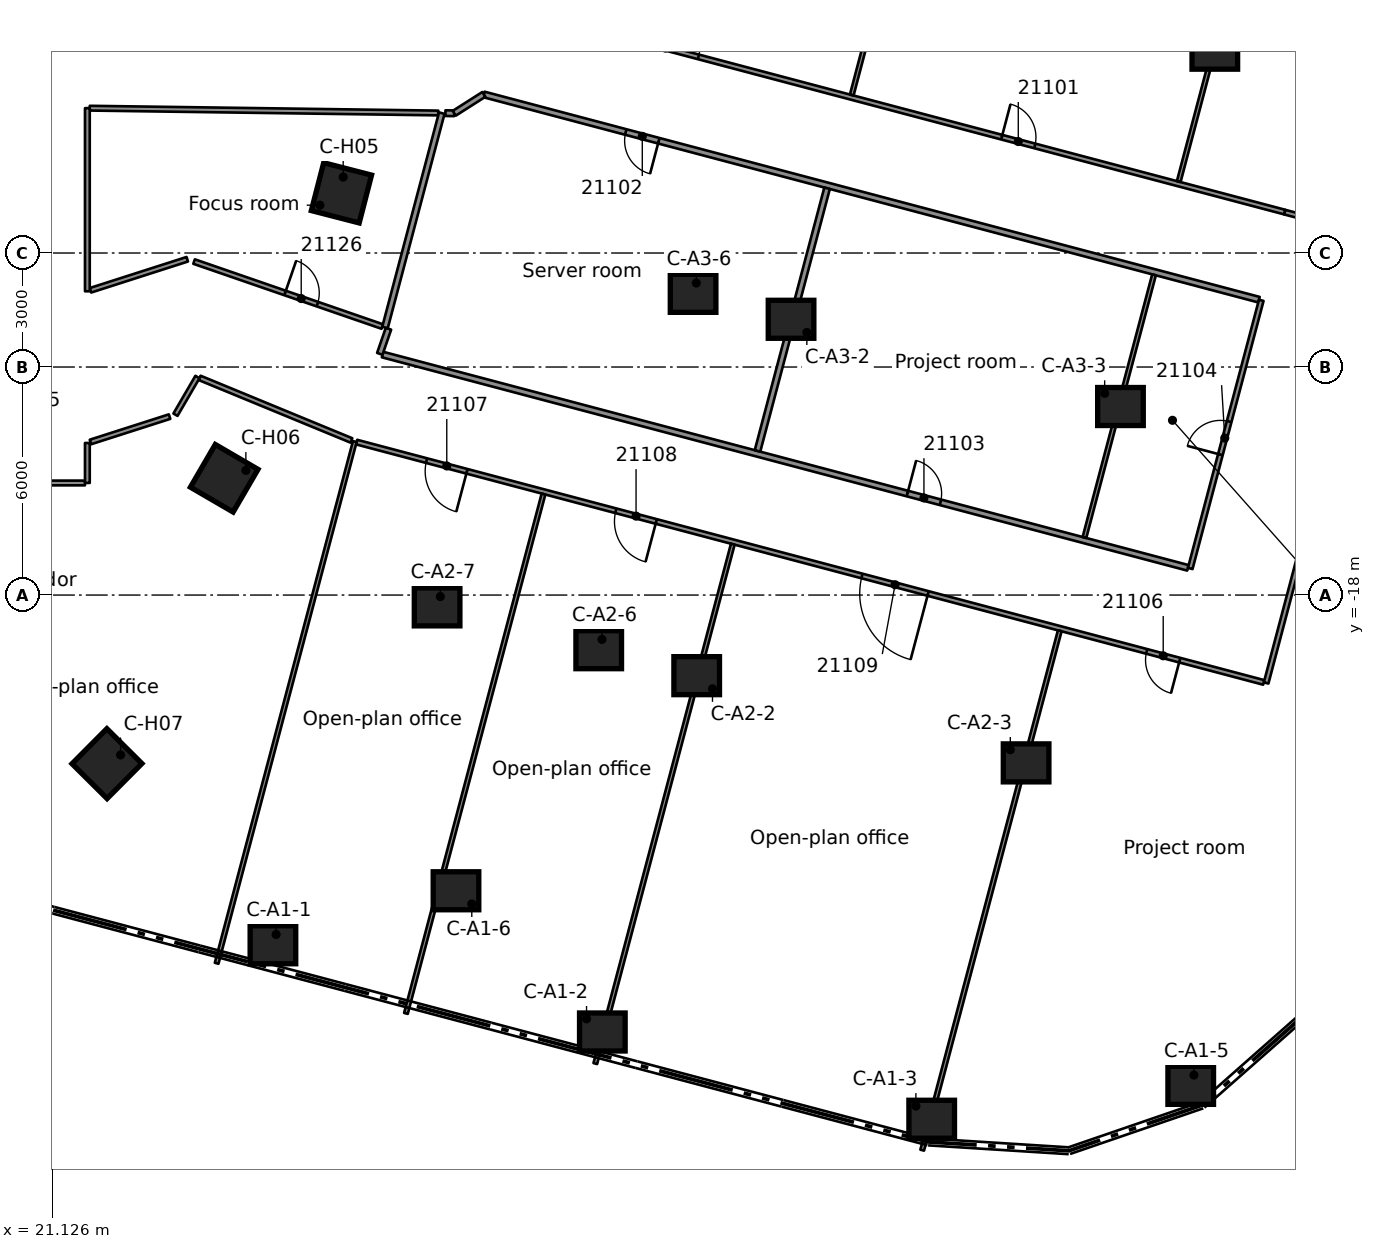
"""IFC4 building model, lengths in metres.
Left out: names, types, materials, properties, quantities, classifications, styles, units other than length and angle.
Written with IfcOpenShell. Run it as: python <this file> out.ifc"""

import sys

from ifc_helpers import new_model, si_unit, direction, frame, frame_2d, origin, origin_2d, place, context, subcontext, project, spatial, rectangle, extrude, element, fill, save


model = new_model("IFC4")
c1 = context("Model", 3, precision=1e-05, world=origin(), true_north=direction((0.0, 1.0)))
c2 = subcontext(c1, "Body", "Model", "MODEL_VIEW")
j1 = project(units=[si_unit("LENGTHUNIT", "METRE"), si_unit("PLANEANGLEUNIT", "RADIAN")], contexts=[c1])
p1 = place(None, origin())
s1 = spatial("IfcSite", under=j1, at=p1, CompositionType="ELEMENT")
p2 = place(p1, origin())
s2 = spatial("IfcBuilding", under=s1, at=p2, CompositionType="ELEMENT")
p3 = place(p2, frame((0.0, 0.0, 105.7)))
s3 = spatial("IfcBuildingStorey", under=s2, at=p3, CompositionType="ELEMENT", Elevation=105.7)
for number, where, z_axis, x_axis in (
    (1, (26.934, -27.202, 0.0), (0.0, 0.0, 1.0), (1.0, 0.0, 0.0)),
    (2, (35.602, -29.497, 0.0), (0.0, 0.0, 1.0), (1.0, 0.0, 0.0)),
    (3, (44.269, -31.793, 0.0), (0.0, 0.0, 1.0), (1.0, 0.0, 0.0)),
    (4, (51.085, -30.901, 0.0), (0.0, 0.0, 1.0), (1.0, 0.0, 0.0)),
    (5, (31.751, -25.781, 0.0), (0.0, 0.0, 1.0), (1.0, 0.0, 0.0)),
    (6, (38.085, -20.121, 0.0), (0.0, 0.0, 1.0), (1.0, 0.0, 0.0)),
    (7, (46.753, -22.416, 0.0), (0.0, 0.0, 1.0), (1.0, 0.0, 0.0)),
    (8, (35.507, -19.438, 0.0), (0.0, 0.0, 1.0), (1.0, 0.0, 0.0)),
    (9, (31.254, -18.311, 0.0), (0.0, 0.0, 1.0), (1.0, 0.0, 0.0)),
    (10, (40.568, -10.744, 0.0), (0.0, 0.0, 1.0), (1.0, 0.0, 0.0)),
    (11, (49.236, -13.039, 0.0), (0.0, 0.0, 1.0), (1.0, 0.0, 0.0)),
    (12, (37.99, -10.061, 0.0), (0.0, 0.0, 1.0), (1.0, 0.0, 0.0)),
    (13, (51.719, -3.663, 0.0), (0.0, 0.0, 1.0), (1.0, 0.0, 0.0)),
):
    element("IfcColumn", number, at=place(p3, frame(where, z_axis=z_axis, x_axis=x_axis)), inside=s3, PredefinedType="COLUMN", context=c2, shape_type="SweptSolid", body=[
        extrude(rectangle(XDim=1.2, YDim=1.0, at=origin_2d()), origin(), (0.0, 0.0, 1.0), 3.5),
    ])
for number, where, z_axis, x_axis in (
    (14, (28.737, -7.417, 0.0), (0.0, 0.0, 1.0), (0.968, -0.25, 0.0)),
    (15, (25.652, -14.927, 0.0), (0.0, 0.0, 1.0), (0.864, -0.503, 0.0)),
    (16, (22.567, -22.436, 0.0), (0.0, 0.0, 1.0), (0.709, -0.705, 0.0)),
):
    element("IfcColumn", number, at=place(p3, frame(where, z_axis=z_axis, x_axis=x_axis)), inside=s3, PredefinedType="COLUMN", context=c2, shape_type="SweptSolid", body=[
        extrude(rectangle(XDim=1.3, YDim=1.3, at=origin_2d()), origin(), (0.0, 0.0, 1.0), 3.5),
    ])
p4 = place(p3, frame((25.006, -12.286, 0.0), z_axis=(0.0, 0.0, 1.0), x_axis=(0.924527003777, -0.38111654292, 0.0)))
e17 = element("IfcWall", 17, at=p4, inside=s3, PredefinedType="PARTITIONING", context=c2, shape_type="SweptSolid", body=[
    extrude(rectangle(XDim=4.319, YDim=0.125, at=frame_2d((2.159, 0.0))), origin(), (0.0, 0.0, 1.0), 3.08),
])
p5 = place(p3, frame((24.859, -9.225, 0.0), z_axis=(0.0, 0.0, 1.0), x_axis=(0.945256069843, -0.326329530421, 0.0)))
e18 = element("IfcWall", 18, at=p5, inside=s3, PredefinedType="PARTITIONING", context=c2, shape_type="SweptSolid", body=[
    extrude(rectangle(XDim=5.24, YDim=0.125, at=frame_2d((2.62, 0.0))), origin(), (0.0, 0.0, 1.0), 3.08),
])
p6 = place(p5, frame((2.533, 0.0, 0.0)))
e19 = element("IfcOpeningElement", 19, at=p6, cuts=e18, PredefinedType="OPENING", context=c2, shape_type="SweptSolid", body=[
    extrude(rectangle(XDim=0.9, YDim=2.1, at=frame_2d((0.45, 1.05))), frame((0.0, 0.073, 0.0), z_axis=(0.0, -1.0, 0.0), x_axis=(1.0, 0.0, 0.0)), (0.0, 0.0, 1.0), 0.145),
])
p7 = place(p3, frame((56.106, -8.6, 0.0), z_axis=(0.0, 0.0, 1.0), x_axis=(-0.966610224472, 0.256251193065, 0.0)))
e20 = element("IfcWall", 20, at=p7, inside=s3, PredefinedType="PARTITIONING", context=c2, shape_type="SweptSolid", body=[
    extrude(rectangle(XDim=2.638, YDim=0.125, at=frame_2d((1.319, 0.0))), origin(), (0.0, 0.0, 1.0), 3.08),
])
p8 = place(p3, frame((53.007, -20.299, 0.0), z_axis=(0.0, 0.0, 1.0), x_axis=(-0.966653562273, 0.256087661835, 0.0)))
e21 = element("IfcWall", 21, at=p8, inside=s3, PredefinedType="PARTITIONING", context=c2, shape_type="SweptSolid", body=[
    extrude(rectangle(XDim=24.695, YDim=0.125, at=frame_2d((12.347, 0.0))), origin(), (0.0, 0.0, 1.0), 3.08),
])
p9 = place(p8, frame((2.287, 0.0, 0.0)))
e22 = element("IfcOpeningElement", 22, at=p9, cuts=e21, PredefinedType="OPENING", context=c2, shape_type="SweptSolid", body=[
    extrude(rectangle(XDim=0.9, YDim=2.1, at=frame_2d((0.45, 1.05))), frame((0.0, 0.073, 0.0), z_axis=(0.0, -1.0, 0.0), x_axis=(1.0, 0.0, 0.0)), (0.0, 0.0, 1.0), 0.145),
])
p10 = place(p8, frame((21.69, 0.0, 0.0)))
e23 = element("IfcOpeningElement", 23, at=p10, cuts=e21, PredefinedType="OPENING", context=c2, shape_type="SweptSolid", body=[
    extrude(rectangle(XDim=1.1, YDim=2.1, at=frame_2d((0.55, 1.05))), frame((0.0, 0.073, 0.0), z_axis=(0.0, -1.0, 0.0), x_axis=(1.0, 0.0, 0.0)), (0.0, 0.0, 1.0), 0.145),
])
p11 = place(p8, frame((16.538, 0.0, 0.0)))
e24 = element("IfcOpeningElement", 24, at=p11, cuts=e21, PredefinedType="OPENING", context=c2, shape_type="SweptSolid", body=[
    extrude(rectangle(XDim=1.1, YDim=2.1, at=frame_2d((0.55, 1.05))), frame((0.0, 0.073, 0.0), z_axis=(0.0, -1.0, 0.0), x_axis=(1.0, 0.0, 0.0)), (0.0, 0.0, 1.0), 0.145),
])
p12 = place(p8, frame((9.137, 0.0, 0.0)))
e25 = element("IfcOpeningElement", 25, at=p12, cuts=e21, PredefinedType="OPENING", context=c2, shape_type="SweptSolid", body=[
    extrude(rectangle(XDim=1.8, YDim=2.1, at=frame_2d((0.9, 1.05))), frame((0.0, 0.073, 0.0), z_axis=(0.0, -1.0, 0.0), x_axis=(1.0, 0.0, 0.0)), (0.0, 0.0, 1.0), 0.145),
])
p13 = place(p3, frame((29.819, -11.672, 0.0), z_axis=(0.0, 0.0, 1.0), x_axis=(0.966680429276, -0.255986225517, 0.0)))
e26 = element("IfcWall", 26, at=p13, inside=s3, PredefinedType="PARTITIONING", context=c2, shape_type="SweptSolid", body=[
    extrude(rectangle(XDim=21.922, YDim=0.15, at=frame_2d((10.961, 0.0))), origin(), (0.0, 0.0, 1.0), 3.08),
])
p14 = place(p13, frame((14.287, 0.0, 0.0)))
e27 = element("IfcOpeningElement", 27, at=p14, cuts=e26, PredefinedType="OPENING", context=c2, shape_type="SweptSolid", body=[
    extrude(rectangle(XDim=0.9, YDim=2.1, at=frame_2d((0.45, 1.05))), frame((0.0, 0.085, 0.0), z_axis=(0.0, -1.0, 0.0), x_axis=(1.0, 0.0, 0.0)), (0.0, 0.0, 1.0), 0.17),
])
p15 = place(p3, frame((52.881, -10.228, 0.0), z_axis=(0.0, 0.0, 1.0), x_axis=(-0.966683420864, 0.255974928122, 0.0)))
e28 = element("IfcWall", 28, at=p15, inside=s3, PredefinedType="PARTITIONING", context=c2, shape_type="SweptSolid", body=[
    extrude(rectangle(XDim=21.1, YDim=0.15, at=frame_2d((10.55, 0.0))), origin(), (0.0, 0.0, 1.0), 3.08),
])
p16 = place(p15, frame((16.337, 0.0, 0.0)))
e29 = element("IfcOpeningElement", 29, at=p16, cuts=e28, PredefinedType="OPENING", context=c2, shape_type="SweptSolid", body=[
    extrude(rectangle(XDim=0.9, YDim=2.1, at=frame_2d((0.45, 1.05))), frame((0.0, 0.085, 0.0), z_axis=(0.0, -1.0, 0.0), x_axis=(1.0, 0.0, 0.0)), (0.0, 0.0, 1.0), 0.17),
])
p17 = place(p3, frame((32.263, -2.286, 0.0), z_axis=(0.0, 0.0, 1.0), x_axis=(0.966698776393, -0.255916931288, 0.0)))
e30 = element("IfcWall", 30, at=p17, inside=s3, PredefinedType="PARTITIONING", context=c2, shape_type="SweptSolid", body=[
    extrude(rectangle(XDim=22.028, YDim=0.125, at=frame_2d((11.014, 0.0))), origin(), (0.0, 0.0, 1.0), 3.08),
])
p18 = place(p17, frame((4.27, 0.0, 0.0)))
e31 = element("IfcOpeningElement", 31, at=p18, cuts=e30, PredefinedType="OPENING", context=c2, shape_type="SweptSolid", body=[
    extrude(rectangle(XDim=1.8, YDim=2.1, at=frame_2d((0.9, 1.05))), frame((0.0, 0.073, 0.0), z_axis=(0.0, -1.0, 0.0), x_axis=(1.0, 0.0, 0.0)), (0.0, 0.0, 1.0), 0.145),
])
p19 = place(p17, frame((14.326, 0.0, 0.0)))
e32 = element("IfcOpeningElement", 32, at=p19, cuts=e30, PredefinedType="OPENING", context=c2, shape_type="SweptSolid", body=[
    extrude(rectangle(XDim=0.9, YDim=2.1, at=frame_2d((0.45, 1.05))), frame((0.0, 0.073, 0.0), z_axis=(0.0, -1.0, 0.0), x_axis=(1.0, 0.0, 0.0)), (0.0, 0.0, 1.0), 0.145),
])
p20 = place(p3, frame((31.473, -5.32, 0.0), z_axis=(0.0, 0.0, 1.0), x_axis=(0.999857302277, -0.016893048402, 0.0)))
e33 = element("IfcWall", 33, at=p20, inside=s3, PredefinedType="PARTITIONING", context=c2, shape_type="SweptSolid", body=[
    extrude(rectangle(XDim=0.231, YDim=0.15, at=frame_2d((0.116, 0.0))), origin(), (0.0, 0.0, 1.0), 3.08),
])
p21 = place(p3, frame((22.113, -5.189, 0.0), z_axis=(0.0, 0.0, 1.0), x_axis=(0.99990421927, -0.013840241536, 0.0)))
e34 = element("IfcWall", 34, at=p21, inside=s3, PredefinedType="PARTITIONING", context=c2, shape_type="SweptSolid", body=[
    extrude(rectangle(XDim=9.173, YDim=0.125, at=frame_2d((4.586, 0.0))), origin(), (0.0, 0.0, 1.0), 3.08),
])
p22 = place(p3, frame((21.988, -15.051, 0.0), z_axis=(0.0, 0.0, 1.0), x_axis=(-1.0, 0.0, 0.0)))
e35 = element("IfcWall", 35, at=p22, inside=s3, PredefinedType="PARTITIONING", context=c2, shape_type="SweptSolid", body=[
    extrude(rectangle(XDim=10.997, YDim=0.125, at=frame_2d((5.499, 0.0))), origin(), (0.0, 0.0, 1.0), 3.08),
])
p23 = place(p22, frame((7.816, 0.0, 0.0)))
e36 = element("IfcOpeningElement", 36, at=p23, cuts=e35, PredefinedType="OPENING", context=c2, shape_type="SweptSolid", body=[
    extrude(rectangle(XDim=0.9, YDim=2.1, at=frame_2d((0.45, 1.05))), frame((0.0, 0.073, 0.0), z_axis=(0.0, -1.0, 0.0), x_axis=(1.0, 0.0, 0.0)), (0.0, 0.0, 1.0), 0.145),
])
p24 = place(p22, frame((1.788, 0.0, 0.0)))
e37 = element("IfcOpeningElement", 37, at=p24, cuts=e35, PredefinedType="OPENING", context=c2, shape_type="SweptSolid", body=[
    extrude(rectangle(XDim=1.8, YDim=2.1, at=frame_2d((0.9, 1.05))), frame((0.0, 0.073, 0.0), z_axis=(0.0, -1.0, 0.0), x_axis=(1.0, 0.0, 0.0)), (0.0, 0.0, 1.0), 0.145),
])
p25 = place(p3, frame((22.133, -13.972, 0.0), z_axis=(0.0, 0.0, 1.0), x_axis=(0.952283953223, 0.30521348665, 0.0)))
e38 = element("IfcWall", 38, at=p25, inside=s3, PredefinedType="PARTITIONING", context=c2, shape_type="SweptSolid", body=[
    extrude(rectangle(XDim=2.185, YDim=0.125, at=frame_2d((1.093, 0.0))), origin(), (0.0, 0.0, 1.0), 3.08),
])
p26 = place(p3, frame((22.133, -9.981, 0.0), z_axis=(0.0, 0.0, 1.0), x_axis=(0.952218321785, 0.305418184882, 0.0)))
e39 = element("IfcWall", 39, at=p26, inside=s3, PredefinedType="PARTITIONING", context=c2, shape_type="SweptSolid", body=[
    extrude(rectangle(XDim=2.675, YDim=0.125, at=frame_2d((1.337, 0.0))), origin(), (0.0, 0.0, 1.0), 3.08),
])
p27 = place(p3, frame((24.369, -13.255, 0.0), z_axis=(0.0, 0.0, 1.0), x_axis=(0.503804993987, 0.863817415913, 0.0)))
e40 = element("IfcWall", 40, at=p27, inside=s3, PredefinedType="PARTITIONING", context=c2, shape_type="SweptSolid", body=[
    extrude(rectangle(XDim=1.149, YDim=0.125, at=frame_2d((0.575, 0.0))), origin(), (0.0, 0.0, 1.0), 3.08),
])
p28 = place(p3, frame((29.746, -11.653, 0.0), z_axis=(0.0, 0.0, 1.0), x_axis=(0.326055233701, 0.945350720408, 0.0)))
e41 = element("IfcWall", 41, at=p28, inside=s3, PredefinedType="PARTITIONING", context=c2, shape_type="SweptSolid", body=[
    extrude(rectangle(XDim=0.699, YDim=0.15, at=frame_2d((0.35, 0.0))), origin(), (0.0, 0.0, 1.0), 3.08),
])
p29 = place(p3, frame((56.165, -8.616, 0.0), z_axis=(0.0, 0.0, 1.0), x_axis=(-0.255867603739, -0.966711833669, 0.0)))
e42 = element("IfcWall", 42, at=p29, inside=s3, PredefinedType="PARTITIONING", context=c2, shape_type="SweptSolid", body=[
    extrude(rectangle(XDim=12.1, YDim=0.125, at=frame_2d((6.05, 0.0))), origin(), (0.0, 0.0, 1.0), 3.08),
])
p30 = place(p29, frame((3.75, 0.0, 0.0)))
e43 = element("IfcOpeningElement", 43, at=p30, cuts=e42, PredefinedType="OPENING", context=c2, shape_type="SweptSolid", body=[
    extrude(rectangle(XDim=0.9, YDim=2.1, at=frame_2d((0.45, 1.05))), frame((0.0, 0.073, 0.0), z_axis=(0.0, -1.0, 0.0), x_axis=(1.0, 0.0, 0.0)), (0.0, 0.0, 1.0), 0.145),
])
p31 = place(p3, frame((51.072, -17.301, 0.0), z_axis=(0.0, 0.0, 1.0), x_axis=(0.256040569916, 0.966666036725, 0.0)))
e44 = element("IfcWall", 44, at=p31, inside=s3, PredefinedType="PARTITIONING", context=c2, shape_type="SweptSolid", body=[
    extrude(rectangle(XDim=7.299, YDim=0.125, at=frame_2d((3.65, 0.0))), origin(), (0.0, 0.0, 1.0), 3.08),
])
p32 = place(p31, frame((3.1, 0.0, 0.0)))
e45 = element("IfcOpeningElement", 45, at=p32, cuts=e44, PredefinedType="OPENING", context=c2, shape_type="SweptSolid", body=[
    extrude(rectangle(XDim=0.9, YDim=2.1, at=frame_2d((0.45, 1.05))), frame((0.0, 0.073, 0.0), z_axis=(0.0, -1.0, 0.0), x_axis=(1.0, 0.0, 0.0)), (0.0, 0.0, 1.0), 0.145),
])
p33 = place(p3, frame((44.019, -32.606, 0.0), z_axis=(0.0, 0.0, 1.0), x_axis=(0.25603399679, 0.966667777723, 0.0)))
e46 = element("IfcWall", 46, at=p33, inside=s3, PredefinedType="PARTITIONING", context=c2, shape_type="SweptSolid", body=[
    extrude(rectangle(XDim=14.138, YDim=0.1, at=frame_2d((7.069, 0.0))), origin(), (0.0, 0.0, 1.0), 3.08),
])
p34 = place(p3, frame((48.288, -16.487, 0.0), z_axis=(0.0, 0.0, 1.0), x_axis=(0.256040833757, 0.966665966841, 0.0)))
e47 = element("IfcWall", 47, at=p34, inside=s3, PredefinedType="PARTITIONING", context=c2, shape_type="SweptSolid", body=[
    extrude(rectangle(XDim=7.15, YDim=0.1, at=frame_2d((3.575, 0.0))), origin(), (0.0, 0.0, 1.0), 3.08),
])
p35 = place(p3, frame((50.769, -7.122, 0.0), z_axis=(0.0, 0.0, 1.0), x_axis=(0.255986543434, 0.966680345089, 0.0)))
e48 = element("IfcWall", 48, at=p35, inside=s3, PredefinedType="PARTITIONING", context=c2, shape_type="SweptSolid", body=[
    extrude(rectangle(XDim=14.137, YDim=0.1, at=frame_2d((7.068, 0.0))), origin(), (0.0, 0.0, 1.0), 3.08),
])
p36 = place(p3, frame((35.417, -30.328, 0.0), z_axis=(0.0, 0.0, 1.0), x_axis=(0.255904901066, 0.966701961108, 0.0)))
e49 = element("IfcWall", 49, at=p36, inside=s3, PredefinedType="PARTITIONING", context=c2, shape_type="SweptSolid", body=[
    extrude(rectangle(XDim=14.138, YDim=0.1, at=frame_2d((7.069, 0.0))), origin(), (0.0, 0.0, 1.0), 3.08),
])
p37 = place(p3, frame((39.685, -14.208, 0.0), z_axis=(0.0, 0.0, 1.0), x_axis=(0.256072738338, 0.966657515711, 0.0)))
e50 = element("IfcWall", 50, at=p37, inside=s3, PredefinedType="PARTITIONING", context=c2, shape_type="SweptSolid", body=[
    extrude(rectangle(XDim=7.151, YDim=0.15, at=frame_2d((3.575, 0.0))), origin(), (0.0, 0.0, 1.0), 3.08),
])
p38 = place(p3, frame((42.165, -4.843, 0.0), z_axis=(0.0, 0.0, 1.0), x_axis=(0.255986543434, 0.966680345089, 0.0)))
e51 = element("IfcWall", 51, at=p38, inside=s3, PredefinedType="PARTITIONING", context=c2, shape_type="SweptSolid", body=[
    extrude(rectangle(XDim=14.137, YDim=0.1, at=frame_2d((7.068, 0.0))), origin(), (0.0, 0.0, 1.0), 3.08),
])
p39 = place(p3, frame((30.434, -29.008, 0.0), z_axis=(0.0, 0.0, 1.0), x_axis=(0.256051093289, 0.96666324934, 0.0)))
e52 = element("IfcWall", 52, at=p39, inside=s3, PredefinedType="PARTITIONING", context=c2, shape_type="SweptSolid", body=[
    extrude(rectangle(XDim=14.137, YDim=0.1, at=frame_2d((7.069, 0.0))), origin(), (0.0, 0.0, 1.0), 3.08),
])
p40 = place(p3, frame((25.453, -27.689, 0.0), z_axis=(0.0, 0.0, 1.0), x_axis=(0.255983290364, 0.966681206528, 0.0)))
e53 = element("IfcWall", 53, at=p40, inside=s3, PredefinedType="PARTITIONING", context=c2, shape_type="SweptSolid", body=[
    extrude(rectangle(XDim=14.2, YDim=0.1, at=frame_2d((7.1, 0.0))), origin(), (0.0, 0.0, 1.0), 3.08),
])
p41 = place(p3, frame((29.883, -10.96, 0.0), z_axis=(0.0, 0.0, 1.0), x_axis=(0.256008704633, 0.966674476311, 0.0)))
e54 = element("IfcWall", 54, at=p41, inside=s3, PredefinedType="PARTITIONING", context=c2, shape_type="SweptSolid", body=[
    extrude(rectangle(XDim=5.835, YDim=0.15, at=frame_2d((2.918, 0.0))), origin(), (0.0, 0.0, 1.0), 3.08),
])
p42 = place(p3, frame((31.705, -5.323, 0.0), z_axis=(0.0, 0.0, 1.0), x_axis=(0.84342189249, 0.537251813649, 0.0)))
e55 = element("IfcWall", 55, at=p42, inside=s3, PredefinedType="PARTITIONING", context=c2, shape_type="SweptSolid", body=[
    extrude(rectangle(XDim=0.923, YDim=0.15, at=frame_2d((0.462, 0.0))), origin(), (0.0, 0.0, 1.0), 3.08),
])
p43 = place(p3, frame((22.051, -15.05, 0.0), z_axis=(0.0, 0.0, 1.0), x_axis=(0.0, 1.0, 0.0)))
e56 = element("IfcWall", 56, at=p43, inside=s3, PredefinedType="PARTITIONING", context=c2, shape_type="SweptSolid", body=[
    extrude(rectangle(XDim=1.052, YDim=0.125, at=frame_2d((0.526, 0.0))), origin(), (0.0, 0.0, 1.0), 3.08),
])
p44 = place(p3, frame((22.051, -10.007, 0.0), z_axis=(0.0, 0.0, 1.0), x_axis=(0.0, 1.0, 0.0)))
e57 = element("IfcWall", 57, at=p44, inside=s3, PredefinedType="PARTITIONING", context=c2, shape_type="SweptSolid", body=[
    extrude(rectangle(XDim=4.819, YDim=0.125, at=frame_2d((2.41, 0.0))), origin(), (0.0, 0.0, 1.0), 3.08),
])
p45 = place(p18, origin())
e58 = element("IfcDoor", 58, at=p45, inside=s3, OperationType="DOUBLE_DOOR_SINGLE_SWING", PredefinedType="DOOR", context=c2, shape_type="SweptSolid", body=[
    extrude(rectangle(XDim=1.8, YDim=2.1, at=frame_2d((0.9, 1.05))), frame((0.0, 0.025, 0.0), z_axis=(0.0, -1.0, 0.0), x_axis=(1.0, 0.0, 0.0)), (0.0, 0.0, 1.0), 0.05),
])
fill(e31, e58)
p46 = place(p19, origin())
e59 = element("IfcDoor", 59, at=p46, inside=s3, OperationType="SINGLE_SWING_RIGHT", PredefinedType="DOOR", context=c2, shape_type="SweptSolid", body=[
    extrude(rectangle(XDim=0.9, YDim=2.1, at=frame_2d((0.45, 1.05))), frame((0.0, 0.025, 0.0), z_axis=(0.0, -1.0, 0.0), x_axis=(1.0, 0.0, 0.0)), (0.0, 0.0, 1.0), 0.05),
])
fill(e32, e59)
p47 = place(p16, origin())
e60 = element("IfcDoor", 60, at=p47, inside=s3, OperationType="SINGLE_SWING_RIGHT", PredefinedType="DOOR", context=c2, shape_type="SweptSolid", body=[
    extrude(rectangle(XDim=0.9, YDim=2.1, at=frame_2d((0.45, 1.05))), frame((0.0, 0.025, 0.0), z_axis=(0.0, -1.0, 0.0), x_axis=(1.0, 0.0, 0.0)), (0.0, 0.0, 1.0), 0.05),
])
fill(e29, e60)
p48 = place(p14, origin())
e61 = element("IfcDoor", 61, at=p48, inside=s3, OperationType="SINGLE_SWING_RIGHT", PredefinedType="DOOR", context=c2, shape_type="SweptSolid", body=[
    extrude(rectangle(XDim=0.9, YDim=2.1, at=frame_2d((0.45, 1.05))), frame((0.0, 0.025, 0.0), z_axis=(0.0, -1.0, 0.0), x_axis=(1.0, 0.0, 0.0)), (0.0, 0.0, 1.0), 0.05),
])
fill(e27, e61)
p49 = place(p32, origin())
e62 = element("IfcDoor", 62, at=p49, inside=s3, OperationType="SINGLE_SWING_LEFT", PredefinedType="DOOR", context=c2, shape_type="SweptSolid", body=[
    extrude(rectangle(XDim=0.9, YDim=2.1, at=frame_2d((0.45, 1.05))), frame((0.0, 0.025, 0.0), z_axis=(0.0, -1.0, 0.0), x_axis=(1.0, 0.0, 0.0)), (0.0, 0.0, 1.0), 0.05),
])
fill(e45, e62)
p50 = place(p9, origin())
e63 = element("IfcDoor", 63, at=p50, inside=s3, OperationType="SINGLE_SWING_LEFT", PredefinedType="DOOR", context=c2, shape_type="SweptSolid", body=[
    extrude(rectangle(XDim=0.9, YDim=2.1, at=frame_2d((0.45, 1.05))), frame((0.0, 0.025, 0.0), z_axis=(0.0, -1.0, 0.0), x_axis=(1.0, 0.0, 0.0)), (0.0, 0.0, 1.0), 0.05),
])
fill(e22, e63)
p51 = place(p10, origin())
e64 = element("IfcDoor", 64, at=p51, inside=s3, OperationType="SINGLE_SWING_RIGHT", PredefinedType="DOOR", context=c2, shape_type="SweptSolid", body=[
    extrude(rectangle(XDim=1.1, YDim=2.1, at=frame_2d((0.55, 1.05))), frame((0.0, 0.025, 0.0), z_axis=(0.0, -1.0, 0.0), x_axis=(1.0, 0.0, 0.0)), (0.0, 0.0, 1.0), 0.05),
])
fill(e23, e64)
p52 = place(p11, origin())
e65 = element("IfcDoor", 65, at=p52, inside=s3, OperationType="SINGLE_SWING_RIGHT", PredefinedType="DOOR", context=c2, shape_type="SweptSolid", body=[
    extrude(rectangle(XDim=1.1, YDim=2.1, at=frame_2d((0.55, 1.05))), frame((0.0, 0.025, 0.0), z_axis=(0.0, -1.0, 0.0), x_axis=(1.0, 0.0, 0.0)), (0.0, 0.0, 1.0), 0.05),
])
fill(e24, e65)
p53 = place(p12, origin())
e66 = element("IfcDoor", 66, at=p53, inside=s3, OperationType="DOUBLE_DOOR_SINGLE_SWING", PredefinedType="DOOR", context=c2, shape_type="SweptSolid", body=[
    extrude(rectangle(XDim=1.8, YDim=2.1, at=frame_2d((0.9, 1.05))), frame((0.0, 0.025, 0.0), z_axis=(0.0, -1.0, 0.0), x_axis=(1.0, 0.0, 0.0)), (0.0, 0.0, 1.0), 0.05),
])
fill(e25, e66)
p54 = place(p6, origin())
e67 = element("IfcDoor", 67, at=p54, inside=s3, OperationType="SINGLE_SWING_RIGHT", PredefinedType="DOOR", context=c2, shape_type="SweptSolid", body=[
    extrude(rectangle(XDim=0.9, YDim=2.1, at=frame_2d((0.45, 1.05))), frame((0.0, 0.025, 0.0), z_axis=(0.0, -1.0, 0.0), x_axis=(1.0, 0.0, 0.0)), (0.0, 0.0, 1.0), 0.05),
])
fill(e19, e67)
save(model, sys.argv[1])
